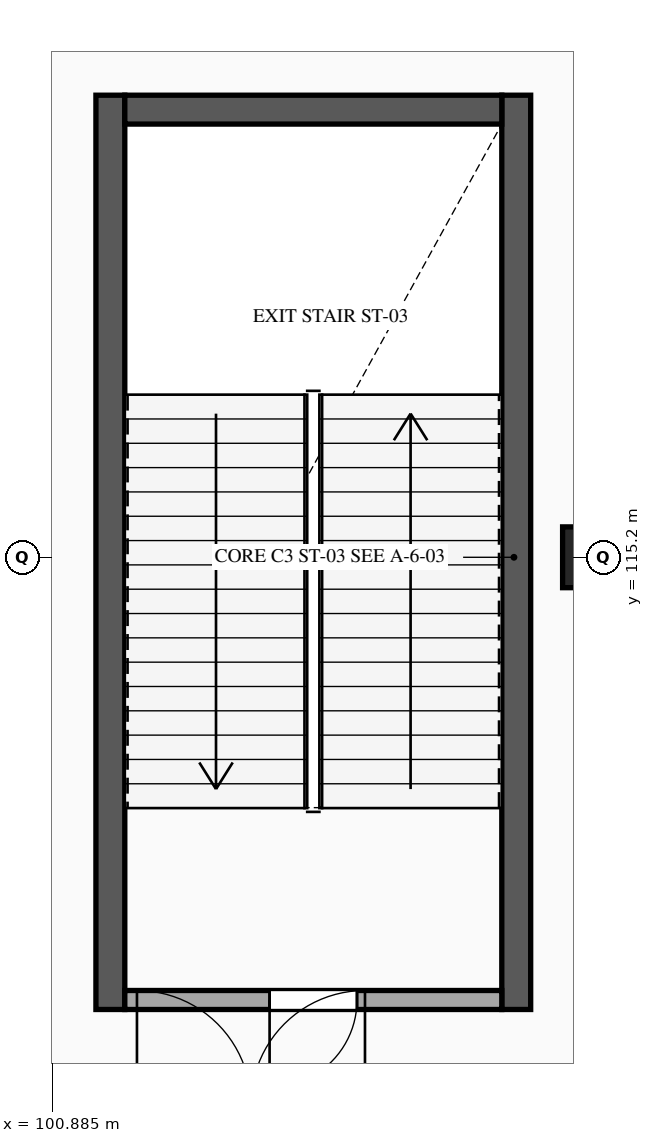
"""IFC4 building model, lengths in metres.
Left out: names, types, materials, properties, quantities, classifications, styles, units other than length and angle.
Written with IfcOpenShell. Run it as: python <this file> out.ifc"""

import sys

from ifc_helpers import new_model, si_unit, direction, frame, frame_2d, origin, origin_2d, place, context, subcontext, project, spatial, rectangle, extrude, element, fill, save


model = new_model("IFC4")
c1 = context("Model", 3, precision=1e-05, world=origin(), true_north=direction((0.0, 1.0)))
c2 = subcontext(c1, "Body", "Model", "MODEL_VIEW")
j1 = project(units=[si_unit("LENGTHUNIT", "METRE"), si_unit("PLANEANGLEUNIT", "RADIAN")], contexts=[c1])
p1 = place(None, origin())
s1 = spatial("IfcSite", under=j1, at=p1, CompositionType="ELEMENT")
p2 = place(p1, origin())
s2 = spatial("IfcBuilding", under=s1, at=p2, CompositionType="ELEMENT")
p3 = place(p2, origin())
s3 = spatial("IfcBuildingStorey", under=s2, at=p3, CompositionType="ELEMENT", Elevation=0.0)
p4 = place(p3, frame((108.0, 115.2, 0.0), z_axis=(0.0, 0.0, 1.0), x_axis=(1.0, 0.0, 0.0)))
e1 = element("IfcColumn", 1, at=p4, inside=s3, PredefinedType="COLUMN", context=c2, shape_type="SweptSolid", body=[
    extrude(rectangle(XDim=0.8, YDim=0.8, at=origin_2d()), origin(), (0.0, 0.0, 1.0), 5.4),
])
for number, where, z_axis, x_axis in (
    (2, (101.65, 109.25, 0.0), (0.0, 0.0, 1.0), (0.0, 1.0, 0.0)),
    (3, (106.99, 121.28, 0.0), (0.0, 0.0, 1.0), (0.0, -1.0, 0.0)),
):
    element("IfcWall", number, at=place(p3, frame(where, z_axis=z_axis, x_axis=x_axis)), inside=s3, PredefinedType="SHEAR", context=c2, shape_type="SweptSolid", body=[
        extrude(rectangle(XDim=12.03, YDim=0.38, at=frame_2d((6.015, 0.0))), origin(), (0.0, 0.0, 1.0), 5.12),
    ])
p5 = place(p3, frame((101.84, 121.09, 0.0), z_axis=(0.0, 0.0, 1.0), x_axis=(1.0, 0.0, 0.0)))
e4 = element("IfcWall", 4, at=p5, inside=s3, PredefinedType="SHEAR", context=c2, shape_type="SweptSolid", body=[
    extrude(rectangle(XDim=4.96, YDim=0.38, at=frame_2d((2.48, 0.0))), origin(), (0.0, 0.0, 1.0), 5.12),
])
p6 = place(p3, frame((106.8, 109.375, 0.0), z_axis=(0.0, 0.0, 1.0), x_axis=(-1.0, 0.0, 0.0)))
e5 = element("IfcWall", 5, at=p6, inside=s3, PredefinedType="STANDARD", context=c2, shape_type="SweptSolid", body=[
    extrude(rectangle(XDim=4.96, YDim=0.25, at=frame_2d((2.48, 0.0))), origin(), (0.0, 0.0, 1.0), 5.08),
])
p7 = place(p6, frame((1.905, 0.0, 0.0)))
e6 = element("IfcOpeningElement", 6, at=p7, cuts=e5, PredefinedType="OPENING", context=c2, shape_type="SweptSolid", body=[
    extrude(rectangle(XDim=1.15, YDim=2.2, at=frame_2d((0.575, 1.1))), frame((0.0, 0.135, 0.0), z_axis=(0.0, -1.0, 0.0), x_axis=(1.0, 0.0, 0.0)), (0.0, 0.0, 1.0), 0.27),
])
p8 = place(p7, origin())
e7 = element("IfcDoor", 7, at=p8, inside=s3, OperationType="SINGLE_SWING_RIGHT", PredefinedType="DOOR", context=c2, shape_type="SweptSolid", body=[
    extrude(rectangle(XDim=1.15, YDim=2.2, at=frame_2d((0.575, 1.1))), frame((0.0, 0.025, 0.0), z_axis=(0.0, -1.0, 0.0), x_axis=(1.0, 0.0, 0.0)), (0.0, 0.0, 1.0), 0.05),
])
fill(e6, e7)
save(model, sys.argv[1])
